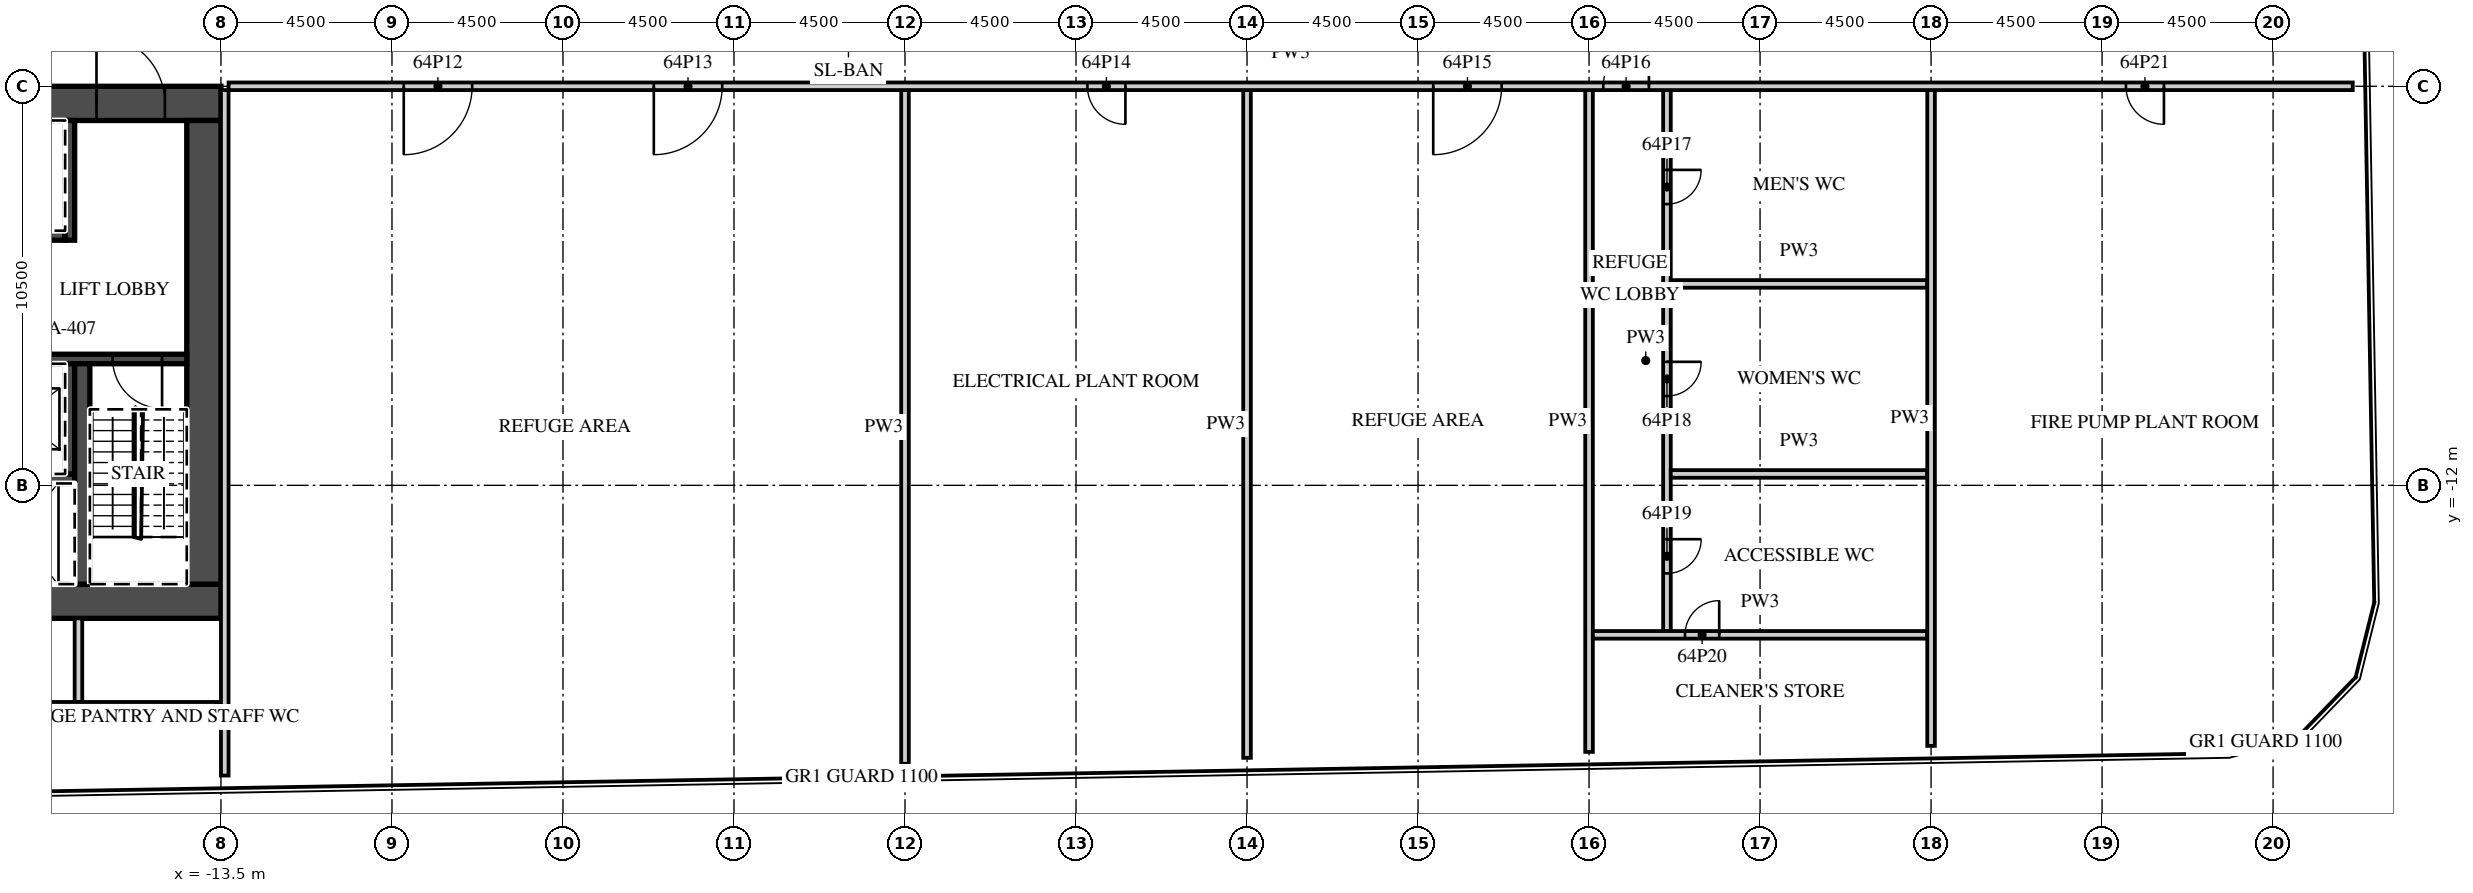
"""IFC4 building model, lengths in metres.
Left out: names, types, materials, properties, quantities, classifications, styles, units other than length and angle.
Written with IfcOpenShell. Run it as: python <this file> out.ifc"""

import sys

from ifc_helpers import new_model, si_unit, direction, frame, frame_2d, origin, place, context, subcontext, project, spatial, rectangle, extrude, element, fill, save


model = new_model("IFC4")
c1 = context("Model", 3, precision=1e-05, world=origin(), true_north=direction((0.0, 1.0)))
c2 = subcontext(c1, "Body", "Model", "MODEL_VIEW")
j1 = project(units=[si_unit("LENGTHUNIT", "METRE"), si_unit("PLANEANGLEUNIT", "RADIAN")], contexts=[c1])
p1 = place(None, origin())
s1 = spatial("IfcSite", under=j1, at=p1, CompositionType="ELEMENT")
p2 = place(p1, origin())
s2 = spatial("IfcBuilding", under=s1, at=p2, CompositionType="ELEMENT")
p3 = place(p2, frame((0.0, 0.0, 257.3)))
s3 = spatial("IfcBuildingStorey", under=s2, at=p3, CompositionType="ELEMENT", Elevation=257.3)
p4 = place(p3, frame((-31.5, -1.95, 0.0), z_axis=(0.0, 0.0, 1.0), x_axis=(1.0, 0.0, 0.0)))
e1 = element("IfcWall", 1, at=p4, inside=s3, PredefinedType="SHEAR", context=c2, shape_type="SweptSolid", body=[
    extrude(rectangle(XDim=18.0, YDim=0.9, at=frame_2d((9.0, 0.0))), origin(), (0.0, 0.0, 1.0), 4.2),
])
p5 = place(p4, frame((14.725, 0.0, 0.0)))
e2 = element("IfcOpeningElement", 2, at=p5, cuts=e1, PredefinedType="OPENING", context=c2, shape_type="SweptSolid", body=[
    extrude(rectangle(XDim=1.8, YDim=2.1, at=frame_2d((0.9, 1.05))), frame((0.0, 0.46, 0.0), z_axis=(0.0, -1.0, 0.0), x_axis=(1.0, 0.0, 0.0)), (0.0, 0.0, 1.0), 0.92),
])
p6 = place(p3, frame((-20.3, -15.05, 0.0), z_axis=(0.0, 0.0, 1.0), x_axis=(1.0, 0.0, 0.0)))
e3 = element("IfcWall", 3, at=p6, inside=s3, PredefinedType="SHEAR", context=c2, shape_type="SweptSolid", body=[
    extrude(rectangle(XDim=6.8, YDim=0.9, at=frame_2d((3.4, 0.0))), origin(), (0.0, 0.0, 1.0), 4.2),
])
p7 = place(p6, frame((0.875, 0.0, 0.0)))
e4 = element("IfcOpeningElement", 4, at=p7, cuts=e3, PredefinedType="OPENING", context=c2, shape_type="SweptSolid", body=[
    extrude(rectangle(XDim=1.2, YDim=2.1, at=frame_2d((0.6, 1.05))), frame((0.0, 0.46, 0.0), z_axis=(0.0, -1.0, 0.0), x_axis=(1.0, 0.0, 0.0)), (0.0, 0.0, 1.0), 0.92),
])
p8 = place(p3, frame((-13.95, -14.6, 0.0), z_axis=(0.0, 0.0, 1.0), x_axis=(0.0, 1.0, 0.0)))
e5 = element("IfcWall", 5, at=p8, inside=s3, PredefinedType="SHEAR", context=c2, shape_type="SweptSolid", body=[
    extrude(rectangle(XDim=12.2, YDim=0.9, at=frame_2d((6.1, 0.0))), origin(), (0.0, 0.0, 1.0), 4.2),
])
p9 = place(p3, frame((-30.6, -5.425, 0.0), z_axis=(0.0, 0.0, 1.0), x_axis=(1.0, 0.0, 0.0)))
e6 = element("IfcWall", 6, at=p9, inside=s3, PredefinedType="SHEAR", context=c2, shape_type="SweptSolid", body=[
    extrude(rectangle(XDim=13.0, YDim=0.25, at=frame_2d((6.5, 0.0))), origin(), (0.0, 0.0, 1.0), 4.2),
])
p10 = place(p9, frame((3.325, 0.0, 0.0)))
e7 = element("IfcOpeningElement", 7, at=p10, cuts=e6, PredefinedType="OPENING", context=c2, shape_type="SweptSolid", body=[
    extrude(rectangle(XDim=1.2, YDim=2.1, at=frame_2d((0.6, 1.05))), frame((0.0, 0.135, 0.0), z_axis=(0.0, -1.0, 0.0), x_axis=(1.0, 0.0, 0.0)), (0.0, 0.0, 1.0), 0.27),
])
p11 = place(p9, frame((5.925, 0.0, 0.0)))
e8 = element("IfcOpeningElement", 8, at=p11, cuts=e6, PredefinedType="OPENING", context=c2, shape_type="SweptSolid", body=[
    extrude(rectangle(XDim=1.2, YDim=2.1, at=frame_2d((0.6, 1.05))), frame((0.0, 0.135, 0.0), z_axis=(0.0, -1.0, 0.0), x_axis=(1.0, 0.0, 0.0)), (0.0, 0.0, 1.0), 0.27),
])
p12 = place(p3, frame((-17.475, -5.55, 0.0), z_axis=(0.0, 0.0, 1.0), x_axis=(0.0, 1.0, 0.0)))
e9 = element("IfcWall", 9, at=p12, inside=s3, PredefinedType="SHEAR", context=c2, shape_type="SweptSolid", body=[
    extrude(rectangle(XDim=3.15, YDim=0.25, at=frame_2d((1.575, 0.0))), origin(), (0.0, 0.0, 1.0), 4.2),
])
p13 = place(p3, frame((-30.6, -8.675, 0.0), z_axis=(0.0, 0.0, 1.0), x_axis=(1.0, 0.0, 0.0)))
e10 = element("IfcWall", 10, at=p13, inside=s3, PredefinedType="SHEAR", context=c2, shape_type="SweptSolid", body=[
    extrude(rectangle(XDim=16.2, YDim=0.25, at=frame_2d((8.1, 0.0))), origin(), (0.0, 0.0, 1.0), 4.2),
])
p14 = place(p13, frame((8.55, 0.0, 0.0)))
e11 = element("IfcOpeningElement", 11, at=p14, cuts=e10, PredefinedType="OPENING", context=c2, shape_type="SweptSolid", body=[
    extrude(rectangle(XDim=1.2, YDim=2.1, at=frame_2d((0.6, 1.05))), frame((0.0, 0.135, 0.0), z_axis=(0.0, -1.0, 0.0), x_axis=(1.0, 0.0, 0.0)), (0.0, 0.0, 1.0), 0.27),
])
p15 = place(p13, frame((11.2, 0.0, 0.0)))
e12 = element("IfcOpeningElement", 12, at=p15, cuts=e10, PredefinedType="OPENING", context=c2, shape_type="SweptSolid", body=[
    extrude(rectangle(XDim=1.2, YDim=2.1, at=frame_2d((0.6, 1.05))), frame((0.0, 0.135, 0.0), z_axis=(0.0, -1.0, 0.0), x_axis=(1.0, 0.0, 0.0)), (0.0, 0.0, 1.0), 0.27),
])
p16 = place(p13, frame((14.25, 0.0, 0.0)))
e13 = element("IfcOpeningElement", 13, at=p16, cuts=e10, PredefinedType="OPENING", context=c2, shape_type="SweptSolid", body=[
    extrude(rectangle(XDim=1.3, YDim=2.1, at=frame_2d((0.65, 1.05))), frame((0.0, 0.135, 0.0), z_axis=(0.0, -1.0, 0.0), x_axis=(1.0, 0.0, 0.0)), (0.0, 0.0, 1.0), 0.27),
])
p17 = place(p13, frame((1.288, 0.0, 0.0)))
e14 = element("IfcOpeningElement", 14, at=p17, cuts=e10, PredefinedType="OPENING", context=c2, shape_type="SweptSolid", body=[
    extrude(rectangle(XDim=1.0, YDim=2.1, at=frame_2d((0.5, 1.05))), frame((0.0, 0.135, 0.0), z_axis=(0.0, -1.0, 0.0), x_axis=(1.0, 0.0, 0.0)), (0.0, 0.0, 1.0), 0.27),
])
p18 = place(p13, frame((5.262, 0.0, 0.0)))
e15 = element("IfcOpeningElement", 15, at=p18, cuts=e10, PredefinedType="OPENING", context=c2, shape_type="SweptSolid", body=[
    extrude(rectangle(XDim=1.0, YDim=2.1, at=frame_2d((0.5, 1.05))), frame((0.0, 0.135, 0.0), z_axis=(0.0, -1.0, 0.0), x_axis=(1.0, 0.0, 0.0)), (0.0, 0.0, 1.0), 0.27),
])
p19 = place(p3, frame((-30.6, -11.825, 0.0), z_axis=(0.0, 0.0, 1.0), x_axis=(1.0, 0.0, 0.0)))
e16 = element("IfcWall", 16, at=p19, inside=s3, PredefinedType="SHEAR", context=c2, shape_type="SweptSolid", body=[
    extrude(rectangle(XDim=13.25, YDim=0.25, at=frame_2d((6.625, 0.0))), origin(), (0.0, 0.0, 1.0), 4.2),
])
p20 = place(p3, frame((-17.475, -11.7, 0.0), z_axis=(0.0, 0.0, 1.0), x_axis=(0.0, 1.0, 0.0)))
e17 = element("IfcWall", 17, at=p20, inside=s3, PredefinedType="SHEAR", context=c2, shape_type="SweptSolid", body=[
    extrude(rectangle(XDim=2.9, YDim=0.25, at=frame_2d((1.45, 0.0))), origin(), (0.0, 0.0, 1.0), 4.2),
])
p21 = place(p3, frame((-17.15, -14.6, 0.0), z_axis=(0.0, 0.0, 1.0), x_axis=(0.0, 1.0, 0.0)))
e18 = element("IfcWall", 18, at=p21, inside=s3, PredefinedType="SHEAR", context=c2, shape_type="SweptSolid", body=[
    extrude(rectangle(XDim=5.8, YDim=0.4, at=frame_2d((2.9, 0.0))), origin(), (0.0, 0.0, 1.0), 4.2),
])
p22 = place(p3, frame((-17.25, -17.7, 0.0), z_axis=(0.0, 0.0, 1.0), x_axis=(0.0, 1.0, 0.0)))
e19 = element("IfcWall", 19, at=p22, inside=s3, PredefinedType="PARTITIONING", context=c2, shape_type="SweptSolid", body=[
    extrude(rectangle(XDim=2.2, YDim=0.2, at=frame_2d((1.1, 0.0))), origin(), (0.0, 0.0, 1.0), 4.2),
])
p23 = place(p3, frame((-35.864, -17.8, 0.0), z_axis=(0.0, 0.0, 1.0), x_axis=(1.0, 0.0, 0.0)))
e20 = element("IfcWall", 20, at=p23, inside=s3, PredefinedType="PARTITIONING", context=c2, shape_type="SweptSolid", body=[
    extrude(rectangle(XDim=22.264, YDim=0.2, at=frame_2d((11.132, 0.0))), origin(), (0.0, 0.0, 1.0), 4.2),
])
p24 = place(p23, frame((6.351, 0.0, 0.0)))
e21 = element("IfcOpeningElement", 21, at=p24, cuts=e20, PredefinedType="OPENING", context=c2, shape_type="SweptSolid", body=[
    extrude(rectangle(XDim=0.9, YDim=2.1, at=frame_2d((0.45, 1.05))), frame((0.0, 0.11, 0.0), z_axis=(0.0, -1.0, 0.0), x_axis=(1.0, 0.0, 0.0)), (0.0, 0.0, 1.0), 0.22),
])
p25 = place(p23, frame((14.651, 0.0, 0.0)))
e22 = element("IfcOpeningElement", 22, at=p25, cuts=e20, PredefinedType="OPENING", context=c2, shape_type="SweptSolid", body=[
    extrude(rectangle(XDim=0.9, YDim=2.1, at=frame_2d((0.45, 1.05))), frame((0.0, 0.11, 0.0), z_axis=(0.0, -1.0, 0.0), x_axis=(1.0, 0.0, 0.0)), (0.0, 0.0, 1.0), 0.22),
])
p26 = place(p3, frame((4.5, -19.327, 0.0), z_axis=(0.0, 0.0, 1.0), x_axis=(0.0, 1.0, 0.0)))
e23 = element("IfcWall", 23, at=p26, inside=s3, PredefinedType="PARTITIONING", context=c2, shape_type="SweptSolid", body=[
    extrude(rectangle(XDim=17.727, YDim=0.2, at=frame_2d((8.863, 0.0))), origin(), (0.0, 0.0, 1.0), 4.2),
])
p27 = place(p3, frame((13.5, -19.17, 0.0), z_axis=(0.0, 0.0, 1.0), x_axis=(0.0, 1.0, 0.0)))
e24 = element("IfcWall", 24, at=p27, inside=s3, PredefinedType="PARTITIONING", context=c2, shape_type="SweptSolid", body=[
    extrude(rectangle(XDim=17.57, YDim=0.2, at=frame_2d((8.785, 0.0))), origin(), (0.0, 0.0, 1.0), 4.2),
])
p28 = place(p3, frame((22.5, -19.013, 0.0), z_axis=(0.0, 0.0, 1.0), x_axis=(0.0, 1.0, 0.0)))
e25 = element("IfcWall", 25, at=p28, inside=s3, PredefinedType="PARTITIONING", context=c2, shape_type="SweptSolid", body=[
    extrude(rectangle(XDim=17.413, YDim=0.2, at=frame_2d((8.706, 0.0))), origin(), (0.0, 0.0, 1.0), 4.2),
])
p29 = place(p3, frame((24.55, -15.834, 0.0), z_axis=(0.0, 0.0, 1.0), x_axis=(0.0, 1.0, 0.0)))
e26 = element("IfcWall", 26, at=p29, inside=s3, PredefinedType="PARTITIONING", context=c2, shape_type="SweptSolid", body=[
    extrude(rectangle(XDim=14.234, YDim=0.2, at=frame_2d((7.117, 0.0))), origin(), (0.0, 0.0, 1.0), 4.2),
])
p30 = place(p29, frame((11.234, 0.0, 0.0)))
e27 = element("IfcOpeningElement", 27, at=p30, cuts=e26, PredefinedType="OPENING", context=c2, shape_type="SweptSolid", body=[
    extrude(rectangle(XDim=0.9, YDim=2.1, at=frame_2d((0.45, 1.05))), frame((0.0, 0.11, 0.0), z_axis=(0.0, -1.0, 0.0), x_axis=(1.0, 0.0, 0.0)), (0.0, 0.0, 1.0), 0.22),
])
p31 = place(p29, frame((6.184, 0.0, 0.0)))
e28 = element("IfcOpeningElement", 28, at=p31, cuts=e26, PredefinedType="OPENING", context=c2, shape_type="SweptSolid", body=[
    extrude(rectangle(XDim=0.9, YDim=2.1, at=frame_2d((0.45, 1.05))), frame((0.0, 0.11, 0.0), z_axis=(0.0, -1.0, 0.0), x_axis=(1.0, 0.0, 0.0)), (0.0, 0.0, 1.0), 0.22),
])
p32 = place(p29, frame((1.517, 0.0, 0.0)))
e29 = element("IfcOpeningElement", 29, at=p32, cuts=e26, PredefinedType="OPENING", context=c2, shape_type="SweptSolid", body=[
    extrude(rectangle(XDim=0.9, YDim=2.1, at=frame_2d((0.45, 1.05))), frame((0.0, 0.11, 0.0), z_axis=(0.0, -1.0, 0.0), x_axis=(1.0, 0.0, 0.0)), (0.0, 0.0, 1.0), 0.22),
])
for number, where, z_axis, x_axis in (
    (30, (24.65, -6.7, 0.0), (0.0, 0.0, 1.0), (1.0, 0.0, 0.0)),
    (31, (24.65, -11.7, 0.0), (0.0, 0.0, 1.0), (1.0, 0.0, 0.0)),
):
    element("IfcWall", number, at=place(p3, frame(where, z_axis=z_axis, x_axis=x_axis)), inside=s3, PredefinedType="PARTITIONING", context=c2, shape_type="SweptSolid", body=[
        extrude(rectangle(XDim=6.75, YDim=0.2, at=frame_2d((3.375, 0.0))), origin(), (0.0, 0.0, 1.0), 4.2),
    ])
p33 = place(p3, frame((22.6, -15.934, 0.0), z_axis=(0.0, 0.0, 1.0), x_axis=(1.0, 0.0, 0.0)))
e32 = element("IfcWall", 32, at=p33, inside=s3, PredefinedType="PARTITIONING", context=c2, shape_type="SweptSolid", body=[
    extrude(rectangle(XDim=8.8, YDim=0.2, at=frame_2d((4.4, 0.0))), origin(), (0.0, 0.0, 1.0), 4.2),
])
p34 = place(p33, frame((2.425, 0.0, 0.0)))
e33 = element("IfcOpeningElement", 33, at=p34, cuts=e32, PredefinedType="OPENING", context=c2, shape_type="SweptSolid", body=[
    extrude(rectangle(XDim=0.9, YDim=2.1, at=frame_2d((0.45, 1.05))), frame((0.0, 0.11, 0.0), z_axis=(0.0, -1.0, 0.0), x_axis=(1.0, 0.0, 0.0)), (0.0, 0.0, 1.0), 0.22),
])
p35 = place(p3, frame((31.5, -18.856, 0.0), z_axis=(0.0, 0.0, 1.0), x_axis=(0.0, 1.0, 0.0)))
e34 = element("IfcWall", 34, at=p35, inside=s3, PredefinedType="PARTITIONING", context=c2, shape_type="SweptSolid", body=[
    extrude(rectangle(XDim=17.256, YDim=0.2, at=frame_2d((8.628, 0.0))), origin(), (0.0, 0.0, 1.0), 4.2),
])
p36 = place(p3, frame((-13.3, -1.5, 0.0), z_axis=(0.0, 0.0, 1.0), x_axis=(1.0, 0.0, 0.0)))
e35 = element("IfcWall", 35, at=p36, inside=s3, PredefinedType="PARTITIONING", context=c2, shape_type="SweptSolid", body=[
    extrude(rectangle(XDim=55.896, YDim=0.2, at=frame_2d((27.948, 0.0))), origin(), (0.0, 0.0, 1.0), 4.2),
])
p37 = place(p36, frame((4.61, 0.0, 0.0)))
e36 = element("IfcOpeningElement", 36, at=p37, cuts=e35, PredefinedType="OPENING", context=c2, shape_type="SweptSolid", body=[
    extrude(rectangle(XDim=1.8, YDim=2.1, at=frame_2d((0.9, 1.05))), frame((0.0, 0.11, 0.0), z_axis=(0.0, -1.0, 0.0), x_axis=(1.0, 0.0, 0.0)), (0.0, 0.0, 1.0), 0.22),
])
p38 = place(p36, frame((11.19, 0.0, 0.0)))
e37 = element("IfcOpeningElement", 37, at=p38, cuts=e35, PredefinedType="OPENING", context=c2, shape_type="SweptSolid", body=[
    extrude(rectangle(XDim=1.8, YDim=2.1, at=frame_2d((0.9, 1.05))), frame((0.0, 0.11, 0.0), z_axis=(0.0, -1.0, 0.0), x_axis=(1.0, 0.0, 0.0)), (0.0, 0.0, 1.0), 0.22),
])
p39 = place(p36, frame((22.6, 0.0, 0.0)))
e38 = element("IfcOpeningElement", 38, at=p39, cuts=e35, PredefinedType="OPENING", context=c2, shape_type="SweptSolid", body=[
    extrude(rectangle(XDim=1.0, YDim=2.1, at=frame_2d((0.5, 1.05))), frame((0.0, 0.11, 0.0), z_axis=(0.0, -1.0, 0.0), x_axis=(1.0, 0.0, 0.0)), (0.0, 0.0, 1.0), 0.22),
])
p40 = place(p36, frame((31.7, 0.0, 0.0)))
e39 = element("IfcOpeningElement", 39, at=p40, cuts=e35, PredefinedType="OPENING", context=c2, shape_type="SweptSolid", body=[
    extrude(rectangle(XDim=1.8, YDim=2.1, at=frame_2d((0.9, 1.05))), frame((0.0, 0.11, 0.0), z_axis=(0.0, -1.0, 0.0), x_axis=(1.0, 0.0, 0.0)), (0.0, 0.0, 1.0), 0.22),
])
p41 = place(p36, frame((36.175, 0.0, 0.0)))
e40 = element("IfcOpeningElement", 40, at=p41, cuts=e35, PredefinedType="OPENING", context=c2, shape_type="SweptSolid", body=[
    extrude(rectangle(XDim=1.2, YDim=2.1, at=frame_2d((0.6, 1.05))), frame((0.0, 0.11, 0.0), z_axis=(0.0, -1.0, 0.0), x_axis=(1.0, 0.0, 0.0)), (0.0, 0.0, 1.0), 0.22),
])
p42 = place(p36, frame((49.928, 0.0, 0.0)))
e41 = element("IfcOpeningElement", 41, at=p42, cuts=e35, PredefinedType="OPENING", context=c2, shape_type="SweptSolid", body=[
    extrude(rectangle(XDim=1.0, YDim=2.1, at=frame_2d((0.5, 1.05))), frame((0.0, 0.11, 0.0), z_axis=(0.0, -1.0, 0.0), x_axis=(1.0, 0.0, 0.0)), (0.0, 0.0, 1.0), 0.22),
])
p43 = place(p3, frame((-13.4, -19.636, 0.0), z_axis=(0.0, 0.0, 1.0), x_axis=(0.0, 1.0, 0.0)))
e42 = element("IfcWall", 42, at=p43, inside=s3, PredefinedType="PARTITIONING", context=c2, shape_type="SweptSolid", body=[
    extrude(rectangle(XDim=18.036, YDim=0.2, at=frame_2d((9.018, 0.0))), origin(), (0.0, 0.0, 1.0), 4.2),
])
p44 = place(p5, origin())
e43 = element("IfcDoor", 43, at=p44, inside=s3, OperationType="DOUBLE_DOOR_DOUBLE_SWING", PredefinedType="DOOR", context=c2, shape_type="SweptSolid", body=[
    extrude(rectangle(XDim=1.8, YDim=2.1, at=frame_2d((0.9, 1.05))), frame((0.0, 0.025, 0.0), z_axis=(0.0, -1.0, 0.0), x_axis=(1.0, 0.0, 0.0)), (0.0, 0.0, 1.0), 0.05),
])
fill(e2, e43)
p45 = place(p16, origin())
e44 = element("IfcDoor", 44, at=p45, inside=s3, OperationType="SINGLE_SWING_RIGHT", PredefinedType="DOOR", context=c2, shape_type="SweptSolid", body=[
    extrude(rectangle(XDim=1.3, YDim=2.1, at=frame_2d((0.65, 1.05))), frame((0.0, 0.025, 0.0), z_axis=(0.0, -1.0, 0.0), x_axis=(1.0, 0.0, 0.0)), (0.0, 0.0, 1.0), 0.05),
])
fill(e13, e44)
p46 = place(p37, origin())
e45 = element("IfcDoor", 45, at=p46, inside=s3, OperationType="DOUBLE_DOOR_DOUBLE_SWING", PredefinedType="DOOR", context=c2, shape_type="SweptSolid", body=[
    extrude(rectangle(XDim=1.8, YDim=2.1, at=frame_2d((0.9, 1.05))), frame((0.0, 0.025, 0.0), z_axis=(0.0, -1.0, 0.0), x_axis=(1.0, 0.0, 0.0)), (0.0, 0.0, 1.0), 0.05),
])
fill(e36, e45)
p47 = place(p38, origin())
e46 = element("IfcDoor", 46, at=p47, inside=s3, OperationType="DOUBLE_DOOR_DOUBLE_SWING", PredefinedType="DOOR", context=c2, shape_type="SweptSolid", body=[
    extrude(rectangle(XDim=1.8, YDim=2.1, at=frame_2d((0.9, 1.05))), frame((0.0, 0.025, 0.0), z_axis=(0.0, -1.0, 0.0), x_axis=(1.0, 0.0, 0.0)), (0.0, 0.0, 1.0), 0.05),
])
fill(e37, e46)
p48 = place(p39, origin())
e47 = element("IfcDoor", 47, at=p48, inside=s3, OperationType="SINGLE_SWING_RIGHT", PredefinedType="DOOR", context=c2, shape_type="SweptSolid", body=[
    extrude(rectangle(XDim=1.0, YDim=2.1, at=frame_2d((0.5, 1.05))), frame((0.0, 0.025, 0.0), z_axis=(0.0, -1.0, 0.0), x_axis=(1.0, 0.0, 0.0)), (0.0, 0.0, 1.0), 0.05),
])
fill(e38, e47)
p49 = place(p40, origin())
e48 = element("IfcDoor", 48, at=p49, inside=s3, OperationType="DOUBLE_DOOR_DOUBLE_SWING", PredefinedType="DOOR", context=c2, shape_type="SweptSolid", body=[
    extrude(rectangle(XDim=1.8, YDim=2.1, at=frame_2d((0.9, 1.05))), frame((0.0, 0.025, 0.0), z_axis=(0.0, -1.0, 0.0), x_axis=(1.0, 0.0, 0.0)), (0.0, 0.0, 1.0), 0.05),
])
fill(e39, e48)
p50 = place(p41, origin())
e49 = element("IfcDoor", 49, at=p50, inside=s3, OperationType="SINGLE_SWING_RIGHT", PredefinedType="DOOR", context=c2, shape_type="SweptSolid", body=[
    extrude(rectangle(XDim=1.2, YDim=2.1, at=frame_2d((0.6, 1.05))), frame((0.0, 0.025, 0.0), z_axis=(0.0, -1.0, 0.0), x_axis=(1.0, 0.0, 0.0)), (0.0, 0.0, 1.0), 0.05),
])
fill(e40, e49)
p51 = place(p30, origin())
e50 = element("IfcDoor", 50, at=p51, inside=s3, OperationType="SINGLE_SWING_RIGHT", PredefinedType="DOOR", context=c2, shape_type="SweptSolid", body=[
    extrude(rectangle(XDim=0.9, YDim=2.1, at=frame_2d((0.45, 1.05))), frame((0.0, 0.025, 0.0), z_axis=(0.0, -1.0, 0.0), x_axis=(1.0, 0.0, 0.0)), (0.0, 0.0, 1.0), 0.05),
])
fill(e27, e50)
p52 = place(p31, origin())
e51 = element("IfcDoor", 51, at=p52, inside=s3, OperationType="SINGLE_SWING_RIGHT", PredefinedType="DOOR", context=c2, shape_type="SweptSolid", body=[
    extrude(rectangle(XDim=0.9, YDim=2.1, at=frame_2d((0.45, 1.05))), frame((0.0, 0.025, 0.0), z_axis=(0.0, -1.0, 0.0), x_axis=(1.0, 0.0, 0.0)), (0.0, 0.0, 1.0), 0.05),
])
fill(e28, e51)
p53 = place(p32, origin())
e52 = element("IfcDoor", 52, at=p53, inside=s3, OperationType="SINGLE_SWING_RIGHT", PredefinedType="DOOR", context=c2, shape_type="SweptSolid", body=[
    extrude(rectangle(XDim=0.9, YDim=2.1, at=frame_2d((0.45, 1.05))), frame((0.0, 0.025, 0.0), z_axis=(0.0, -1.0, 0.0), x_axis=(1.0, 0.0, 0.0)), (0.0, 0.0, 1.0), 0.05),
])
fill(e29, e52)
p54 = place(p34, origin())
e53 = element("IfcDoor", 53, at=p54, inside=s3, OperationType="SINGLE_SWING_RIGHT", PredefinedType="DOOR", context=c2, shape_type="SweptSolid", body=[
    extrude(rectangle(XDim=0.9, YDim=2.1, at=frame_2d((0.45, 1.05))), frame((0.0, 0.025, 0.0), z_axis=(0.0, -1.0, 0.0), x_axis=(1.0, 0.0, 0.0)), (0.0, 0.0, 1.0), 0.05),
])
fill(e33, e53)
p55 = place(p42, origin())
e54 = element("IfcDoor", 54, at=p55, inside=s3, OperationType="SINGLE_SWING_RIGHT", PredefinedType="DOOR", context=c2, shape_type="SweptSolid", body=[
    extrude(rectangle(XDim=1.0, YDim=2.1, at=frame_2d((0.5, 1.05))), frame((0.0, 0.025, 0.0), z_axis=(0.0, -1.0, 0.0), x_axis=(1.0, 0.0, 0.0)), (0.0, 0.0, 1.0), 0.05),
])
fill(e41, e54)
save(model, sys.argv[1])
